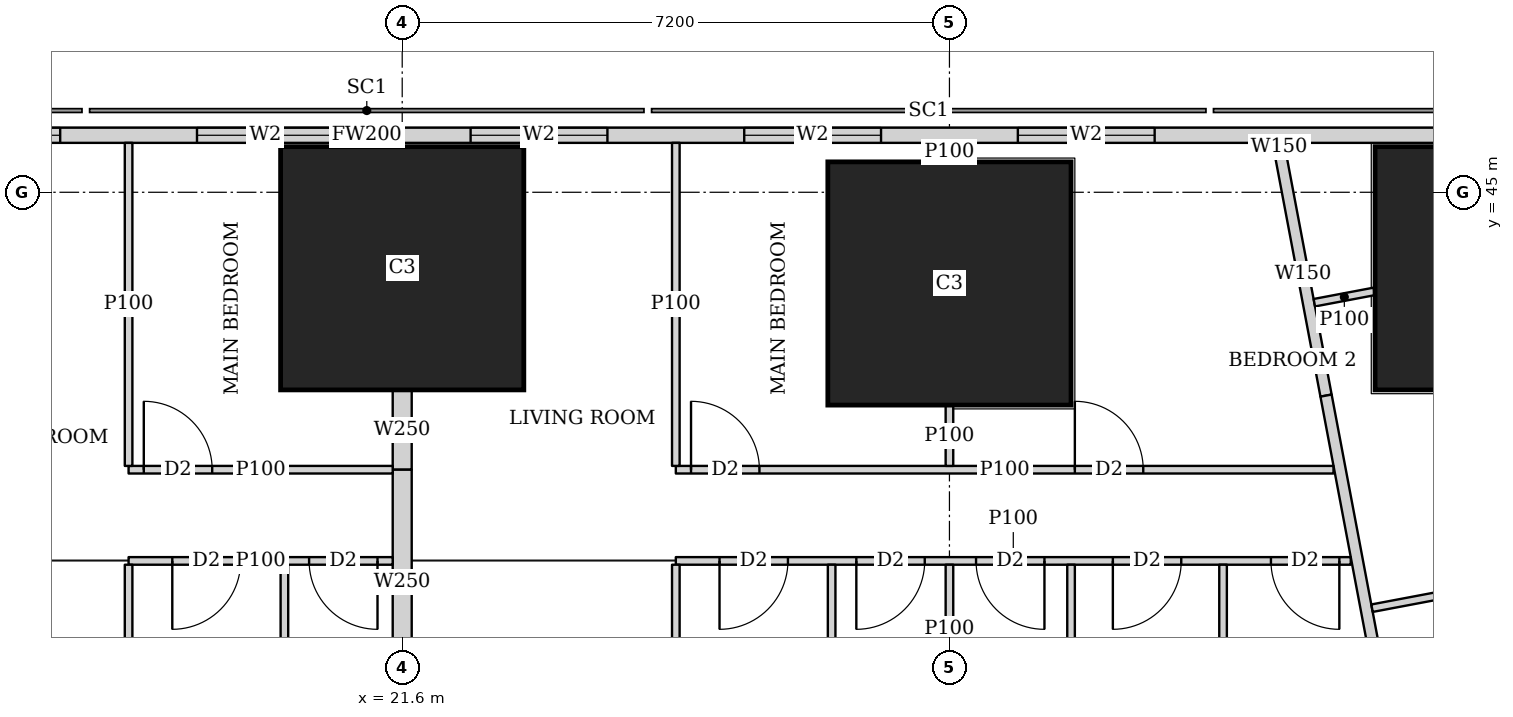
"""IFC4 building model, lengths in metres.
Left out: names, types, materials, properties, quantities, classifications, styles, units other than length and angle.
Written with IfcOpenShell. Run it as: python <this file> out.ifc"""

import sys

from ifc_helpers import new_model, si_unit, direction, frame, frame_2d, origin, origin_2d, place, context, subcontext, project, spatial, rectangle, extrude, element, fill, save


model = new_model("IFC4")
c1 = context("Model", 3, precision=1e-05, world=origin(), true_north=direction((0.0, 1.0)))
c2 = subcontext(c1, "Body", "Model", "MODEL_VIEW")
j1 = project(units=[si_unit("LENGTHUNIT", "METRE"), si_unit("PLANEANGLEUNIT", "RADIAN")], contexts=[c1])
p1 = place(None, origin())
s1 = spatial("IfcSite", under=j1, at=p1, CompositionType="ELEMENT")
p2 = place(p1, origin())
s2 = spatial("IfcBuilding", under=s1, at=p2, CompositionType="ELEMENT")
p3 = place(p2, frame((0.0, 0.0, 20.0)))
s3 = spatial("IfcBuildingStorey", under=s2, at=p3, CompositionType="ELEMENT", Elevation=20.0)
p4 = place(p3, frame((21.6, 44.0, -0.3), z_axis=(0.0, 0.0, 1.0), x_axis=(1.0, 0.0, 0.0)))
e1 = element("IfcColumn", 1, at=p4, inside=s3, PredefinedType="COLUMN", context=c2, shape_type="SweptSolid", body=[
    extrude(rectangle(XDim=3.2, YDim=3.2, at=origin_2d()), origin(), (0.0, 0.0, 1.0), 4.05),
])
p5 = place(p3, frame((28.8, 43.8, 0.0), z_axis=(0.0, 0.0, 1.0), x_axis=(1.0, 0.0, 0.0)))
e2 = element("IfcColumn", 2, at=p5, inside=s3, PredefinedType="COLUMN", context=c2, shape_type="SweptSolid", body=[
    extrude(rectangle(XDim=3.2, YDim=3.2, at=origin_2d()), origin(), (0.0, 0.0, 1.0), 3.75),
])
p6 = place(p3, frame((36.0, 44.0, -0.3), z_axis=(0.0, 0.0, 1.0), x_axis=(1.0, 0.0, 0.0)))
e3 = element("IfcColumn", 3, at=p6, inside=s3, PredefinedType="COLUMN", context=c2, shape_type="SweptSolid", body=[
    extrude(rectangle(XDim=3.2, YDim=3.2, at=origin_2d()), origin(), (0.0, 0.0, 1.0), 4.05),
])
p7 = place(p3, frame((40.106, 45.75, 0.0), z_axis=(0.0, 0.0, 1.0), x_axis=(-1.0, 0.0, 0.0)))
e4 = element("IfcWall", 4, at=p7, inside=s3, PredefinedType="SOLIDWALL", context=c2, shape_type="SweptSolid", body=[
    extrude(rectangle(XDim=37.943, YDim=0.2, at=frame_2d((18.971, 0.0))), origin(), (0.0, 0.0, 1.0), 3.5),
])
p8 = place(p7, frame((8.606, 0.0, 0.9)))
e5 = element("IfcOpeningElement", 5, at=p8, cuts=e4, PredefinedType="OPENING", context=c2, shape_type="SweptSolid", body=[
    extrude(rectangle(XDim=1.8, YDim=1.5, at=frame_2d((0.9, 0.75))), frame((0.0, 0.11, 0.0), z_axis=(0.0, -1.0, 0.0), x_axis=(1.0, 0.0, 0.0)), (0.0, 0.0, 1.0), 0.22),
])
p9 = place(p7, frame((12.206, 0.0, 0.9)))
e6 = element("IfcOpeningElement", 6, at=p9, cuts=e4, PredefinedType="OPENING", context=c2, shape_type="SweptSolid", body=[
    extrude(rectangle(XDim=1.8, YDim=1.5, at=frame_2d((0.9, 0.75))), frame((0.0, 0.11, 0.0), z_axis=(0.0, -1.0, 0.0), x_axis=(1.0, 0.0, 0.0)), (0.0, 0.0, 1.0), 0.22),
])
p10 = place(p7, frame((15.806, 0.0, 0.9)))
e7 = element("IfcOpeningElement", 7, at=p10, cuts=e4, PredefinedType="OPENING", context=c2, shape_type="SweptSolid", body=[
    extrude(rectangle(XDim=1.8, YDim=1.5, at=frame_2d((0.9, 0.75))), frame((0.0, 0.11, 0.0), z_axis=(0.0, -1.0, 0.0), x_axis=(1.0, 0.0, 0.0)), (0.0, 0.0, 1.0), 0.22),
])
p11 = place(p7, frame((19.406, 0.0, 0.9)))
e8 = element("IfcOpeningElement", 8, at=p11, cuts=e4, PredefinedType="OPENING", context=c2, shape_type="SweptSolid", body=[
    extrude(rectangle(XDim=1.8, YDim=1.5, at=frame_2d((0.9, 0.75))), frame((0.0, 0.11, 0.0), z_axis=(0.0, -1.0, 0.0), x_axis=(1.0, 0.0, 0.0)), (0.0, 0.0, 1.0), 0.22),
])
p12 = place(p7, frame((23.006, 0.0, 0.9)))
e9 = element("IfcOpeningElement", 9, at=p12, cuts=e4, PredefinedType="OPENING", context=c2, shape_type="SweptSolid", body=[
    extrude(rectangle(XDim=1.8, YDim=1.5, at=frame_2d((0.9, 0.75))), frame((0.0, 0.11, 0.0), z_axis=(0.0, -1.0, 0.0), x_axis=(1.0, 0.0, 0.0)), (0.0, 0.0, 1.0), 0.22),
])
p13 = place(p7, frame((26.606, 0.0, 0.9)))
e10 = element("IfcOpeningElement", 10, at=p13, cuts=e4, PredefinedType="OPENING", context=c2, shape_type="SweptSolid", body=[
    extrude(rectangle(XDim=1.8, YDim=1.5, at=frame_2d((0.9, 0.75))), frame((0.0, 0.11, 0.0), z_axis=(0.0, -1.0, 0.0), x_axis=(1.0, 0.0, 0.0)), (0.0, 0.0, 1.0), 0.22),
])
p14 = place(p3, frame((33.127, 45.65, 0.0), z_axis=(0.0, 0.0, 1.0), x_axis=(0.184660164975, -0.98280243359, 0.0)))
e11 = element("IfcWall", 11, at=p14, inside=s3, PredefinedType="SOLIDWALL", context=c2, shape_type="SweptSolid", body=[
    extrude(rectangle(XDim=0.119, YDim=0.15, at=frame_2d((0.06, 0.0))), origin(), (0.0, 0.0, 1.0), 3.5),
])
p15 = place(p3, frame((33.149, 45.533, 0.0), z_axis=(0.0, 0.0, 1.0), x_axis=(0.185606774758, -0.98262410166, 0.0)))
e12 = element("IfcWall", 12, at=p15, inside=s3, PredefinedType="SOLIDWALL", context=c2, shape_type="SweptSolid", body=[
    extrude(rectangle(XDim=3.265, YDim=0.15, at=frame_2d((1.632, 0.0))), origin(), (0.0, 0.0, 1.0), 2.05),
])
p16 = place(p3, frame((33.755, 42.325, 0.0), z_axis=(0.0, 0.0, 1.0), x_axis=(0.185611461091, -0.982623216453, 0.0)))
e13 = element("IfcWall", 13, at=p16, inside=s3, PredefinedType="SOLIDWALL", context=c2, shape_type="SweptSolid", body=[
    extrude(rectangle(XDim=40.241, YDim=0.15, at=frame_2d((20.121, 0.0))), origin(), (0.0, 0.0, 1.0), 2.5),
])
p17 = place(p16, frame((7.325, 0.0, 0.0)))
e14 = element("IfcOpeningElement", 14, at=p17, cuts=e13, PredefinedType="OPENING", context=c2, shape_type="SweptSolid", body=[
    extrude(rectangle(XDim=1.0, YDim=2.1, at=frame_2d((0.5, 1.05))), frame((0.0, 0.085, 0.0), z_axis=(0.0, -1.0, 0.0), x_axis=(1.0, 0.0, 0.0)), (0.0, 0.0, 1.0), 0.17),
])
p18 = place(p16, frame((11.902, 0.0, 0.0)))
e15 = element("IfcOpeningElement", 15, at=p18, cuts=e13, PredefinedType="OPENING", context=c2, shape_type="SweptSolid", body=[
    extrude(rectangle(XDim=1.0, YDim=2.1, at=frame_2d((0.5, 1.05))), frame((0.0, 0.085, 0.0), z_axis=(0.0, -1.0, 0.0), x_axis=(1.0, 0.0, 0.0)), (0.0, 0.0, 1.0), 0.17),
])
p19 = place(p16, frame((25.718, 0.0, 0.0)))
e16 = element("IfcOpeningElement", 16, at=p19, cuts=e13, PredefinedType="OPENING", context=c2, shape_type="SweptSolid", body=[
    extrude(rectangle(XDim=1.0, YDim=2.1, at=frame_2d((0.5, 1.05))), frame((0.0, 0.085, 0.0), z_axis=(0.0, -1.0, 0.0), x_axis=(1.0, 0.0, 0.0)), (0.0, 0.0, 1.0), 0.17),
])
p20 = place(p16, frame((31.788, 0.0, 0.0)))
e17 = element("IfcOpeningElement", 17, at=p20, cuts=e13, PredefinedType="OPENING", context=c2, shape_type="SweptSolid", body=[
    extrude(rectangle(XDim=1.0, YDim=2.1, at=frame_2d((0.5, 1.05))), frame((0.0, 0.085, 0.0), z_axis=(0.0, -1.0, 0.0), x_axis=(1.0, 0.0, 0.0)), (0.0, 0.0, 1.0), 0.17),
])
p21 = place(p3, frame((34.39, 43.696, 0.0), z_axis=(0.0, 0.0, 1.0), x_axis=(-0.982640737979, -0.185518678479, 0.0)))
e18 = element("IfcWall", 18, at=p21, inside=s3, PredefinedType="PARTITIONING", context=c2, shape_type="SweptSolid", body=[
    extrude(rectangle(XDim=0.803, YDim=0.1, at=frame_2d((0.401, 0.0))), origin(), (0.0, 0.0, 1.0), 2.05),
])
p22 = place(p3, frame((37.823, 40.182, 0.0), z_axis=(0.0, 0.0, 1.0), x_axis=(-0.98263926043, -0.185526504472, 0.0)))
e19 = element("IfcWall", 19, at=p22, inside=s3, PredefinedType="PARTITIONING", context=c2, shape_type="SweptSolid", body=[
    extrude(rectangle(XDim=3.524, YDim=0.1, at=frame_2d((1.762, 0.0))), origin(), (0.0, 0.0, 1.0), 3.5),
])
p23 = place(p3, frame((18.0, 41.35, 0.0), z_axis=(0.0, 0.0, 1.0), x_axis=(1.0, 0.0, 0.0)))
e20 = element("IfcWall", 20, at=p23, inside=s3, PredefinedType="PARTITIONING", context=c2, shape_type="SweptSolid", body=[
    extrude(rectangle(XDim=3.475, YDim=0.1, at=frame_2d((1.738, 0.0))), origin(), (0.0, 0.0, 1.0), 3.5),
])
p24 = place(p23, frame((0.2, 0.0, 0.0)))
e21 = element("IfcOpeningElement", 21, at=p24, cuts=e20, PredefinedType="OPENING", context=c2, shape_type="SweptSolid", body=[
    extrude(rectangle(XDim=0.9, YDim=2.1, at=frame_2d((0.45, 1.05))), frame((0.0, 0.06, 0.0), z_axis=(0.0, -1.0, 0.0), x_axis=(1.0, 0.0, 0.0)), (0.0, 0.0, 1.0), 0.12),
])
p25 = place(p3, frame((18.0, 40.15, 0.0), z_axis=(0.0, 0.0, 1.0), x_axis=(1.0, 0.0, 0.0)))
e22 = element("IfcWall", 22, at=p25, inside=s3, PredefinedType="PARTITIONING", context=c2, shape_type="SweptSolid", body=[
    extrude(rectangle(XDim=3.475, YDim=0.1, at=frame_2d((1.738, 0.0))), origin(), (0.0, 0.0, 1.0), 3.5),
])
p26 = place(p25, frame((0.575, 0.0, 0.0)))
e23 = element("IfcOpeningElement", 23, at=p26, cuts=e22, PredefinedType="OPENING", context=c2, shape_type="SweptSolid", body=[
    extrude(rectangle(XDim=0.9, YDim=2.1, at=frame_2d((0.45, 1.05))), frame((0.0, 0.06, 0.0), z_axis=(0.0, -1.0, 0.0), x_axis=(1.0, 0.0, 0.0)), (0.0, 0.0, 1.0), 0.12),
])
p27 = place(p25, frame((2.375, 0.0, 0.0)))
e24 = element("IfcOpeningElement", 24, at=p27, cuts=e22, PredefinedType="OPENING", context=c2, shape_type="SweptSolid", body=[
    extrude(rectangle(XDim=0.9, YDim=2.1, at=frame_2d((0.45, 1.05))), frame((0.0, 0.06, 0.0), z_axis=(0.0, -1.0, 0.0), x_axis=(1.0, 0.0, 0.0)), (0.0, 0.0, 1.0), 0.12),
])
p28 = place(p3, frame((18.0, 41.4, 0.0), z_axis=(0.0, 0.0, 1.0), x_axis=(0.0, 1.0, 0.0)))
e25 = element("IfcWall", 25, at=p28, inside=s3, PredefinedType="PARTITIONING", context=c2, shape_type="SweptSolid", body=[
    extrude(rectangle(XDim=4.25, YDim=0.1, at=frame_2d((2.125, 0.0))), origin(), (0.0, 0.0, 1.0), 2.05),
])
for number, where, z_axis, x_axis in (
    (26, (18.0, 36.575, 0.0), (0.0, 0.0, 1.0), (0.0, 1.0, 0.0)),
    (27, (20.05, 36.575, 0.0), (0.0, 0.0, 1.0), (0.0, 1.0, 0.0)),
):
    element("IfcWall", number, at=place(p3, frame(where, z_axis=z_axis, x_axis=x_axis)), inside=s3, PredefinedType="PARTITIONING", context=c2, shape_type="SweptSolid", body=[
        extrude(rectangle(XDim=3.525, YDim=0.1, at=frame_2d((1.763, 0.0))), origin(), (0.0, 0.0, 1.0), 3.5),
    ])
p29 = place(p3, frame((25.2, 41.35, 0.0), z_axis=(0.0, 0.0, 1.0), x_axis=(1.0, 0.0, 0.0)))
e28 = element("IfcWall", 28, at=p29, inside=s3, PredefinedType="PARTITIONING", context=c2, shape_type="SweptSolid", body=[
    extrude(rectangle(XDim=8.653, YDim=0.1, at=frame_2d((4.327, 0.0))), origin(), (0.0, 0.0, 1.0), 3.5),
])
p30 = place(p29, frame((0.2, 0.0, 0.0)))
e29 = element("IfcOpeningElement", 29, at=p30, cuts=e28, PredefinedType="OPENING", context=c2, shape_type="SweptSolid", body=[
    extrude(rectangle(XDim=0.9, YDim=2.1, at=frame_2d((0.45, 1.05))), frame((0.0, 0.06, 0.0), z_axis=(0.0, -1.0, 0.0), x_axis=(1.0, 0.0, 0.0)), (0.0, 0.0, 1.0), 0.12),
])
p31 = place(p29, frame((5.25, 0.0, 0.0)))
e30 = element("IfcOpeningElement", 30, at=p31, cuts=e28, PredefinedType="OPENING", context=c2, shape_type="SweptSolid", body=[
    extrude(rectangle(XDim=0.9, YDim=2.1, at=frame_2d((0.45, 1.05))), frame((0.0, 0.06, 0.0), z_axis=(0.0, -1.0, 0.0), x_axis=(1.0, 0.0, 0.0)), (0.0, 0.0, 1.0), 0.12),
])
p32 = place(p3, frame((25.2, 40.15, 0.0), z_axis=(0.0, 0.0, 1.0), x_axis=(1.0, 0.0, 0.0)))
e31 = element("IfcWall", 31, at=p32, inside=s3, PredefinedType="PARTITIONING", context=c2, shape_type="SweptSolid", body=[
    extrude(rectangle(XDim=8.88, YDim=0.1, at=frame_2d((4.44, 0.0))), origin(), (0.0, 0.0, 1.0), 3.5),
])
p33 = place(p32, frame((0.575, 0.0, 0.0)))
e32 = element("IfcOpeningElement", 32, at=p33, cuts=e31, PredefinedType="OPENING", context=c2, shape_type="SweptSolid", body=[
    extrude(rectangle(XDim=0.9, YDim=2.1, at=frame_2d((0.45, 1.05))), frame((0.0, 0.06, 0.0), z_axis=(0.0, -1.0, 0.0), x_axis=(1.0, 0.0, 0.0)), (0.0, 0.0, 1.0), 0.12),
])
p34 = place(p32, frame((3.95, 0.0, 0.0)))
e33 = element("IfcOpeningElement", 33, at=p34, cuts=e31, PredefinedType="OPENING", context=c2, shape_type="SweptSolid", body=[
    extrude(rectangle(XDim=0.9, YDim=2.1, at=frame_2d((0.45, 1.05))), frame((0.0, 0.06, 0.0), z_axis=(0.0, -1.0, 0.0), x_axis=(1.0, 0.0, 0.0)), (0.0, 0.0, 1.0), 0.12),
])
p35 = place(p32, frame((7.83, 0.0, 0.0)))
e34 = element("IfcOpeningElement", 34, at=p35, cuts=e31, PredefinedType="OPENING", context=c2, shape_type="SweptSolid", body=[
    extrude(rectangle(XDim=0.9, YDim=2.1, at=frame_2d((0.45, 1.05))), frame((0.0, 0.06, 0.0), z_axis=(0.0, -1.0, 0.0), x_axis=(1.0, 0.0, 0.0)), (0.0, 0.0, 1.0), 0.12),
])
p36 = place(p32, frame((2.375, 0.0, 0.0)))
e35 = element("IfcOpeningElement", 35, at=p36, cuts=e31, PredefinedType="OPENING", context=c2, shape_type="SweptSolid", body=[
    extrude(rectangle(XDim=0.9, YDim=2.1, at=frame_2d((0.45, 1.05))), frame((0.0, 0.06, 0.0), z_axis=(0.0, -1.0, 0.0), x_axis=(1.0, 0.0, 0.0)), (0.0, 0.0, 1.0), 0.12),
])
p37 = place(p32, frame((5.75, 0.0, 0.0)))
e36 = element("IfcOpeningElement", 36, at=p37, cuts=e31, PredefinedType="OPENING", context=c2, shape_type="SweptSolid", body=[
    extrude(rectangle(XDim=0.9, YDim=2.1, at=frame_2d((0.45, 1.05))), frame((0.0, 0.06, 0.0), z_axis=(0.0, -1.0, 0.0), x_axis=(1.0, 0.0, 0.0)), (0.0, 0.0, 1.0), 0.12),
])
p38 = place(p3, frame((25.2, 41.4, 0.0), z_axis=(0.0, 0.0, 1.0), x_axis=(0.0, 1.0, 0.0)))
e37 = element("IfcWall", 37, at=p38, inside=s3, PredefinedType="PARTITIONING", context=c2, shape_type="SweptSolid", body=[
    extrude(rectangle(XDim=4.25, YDim=0.1, at=frame_2d((2.125, 0.0))), origin(), (0.0, 0.0, 1.0), 2.05),
])
p39 = place(p3, frame((28.8, 41.4, 0.0), z_axis=(0.0, 0.0, 1.0), x_axis=(0.0, 1.0, 0.0)))
e38 = element("IfcWall", 38, at=p39, inside=s3, PredefinedType="PARTITIONING", context=c2, shape_type="SweptSolid", body=[
    extrude(rectangle(XDim=0.799, YDim=0.1, at=frame_2d((0.399, 0.0))), origin(), (0.0, 0.0, 1.0), 3.5),
])
p40 = place(p3, frame((28.8, 45.401, 0.0), z_axis=(0.0, 0.0, 1.0), x_axis=(0.0, 1.0, 0.0)))
e39 = element("IfcWall", 39, at=p40, inside=s3, PredefinedType="PARTITIONING", context=c2, shape_type="SweptSolid", body=[
    extrude(rectangle(XDim=0.249, YDim=0.1, at=frame_2d((0.125, 0.0))), origin(), (0.0, 0.0, 1.0), 3.5),
])
p41 = place(p3, frame((25.2, 36.575, 0.0), z_axis=(0.0, 0.0, 1.0), x_axis=(0.0, 1.0, 0.0)))
e40 = element("IfcWall", 40, at=p41, inside=s3, PredefinedType="PARTITIONING", context=c2, shape_type="SweptSolid", body=[
    extrude(rectangle(XDim=3.525, YDim=0.1, at=frame_2d((1.763, 0.0))), origin(), (0.0, 0.0, 1.0), 3.5),
])
p42 = place(p3, frame((28.8, 38.401, 0.0), z_axis=(0.0, 0.0, 1.0), x_axis=(0.0, 1.0, 0.0)))
e41 = element("IfcWall", 41, at=p42, inside=s3, PredefinedType="PARTITIONING", context=c2, shape_type="SweptSolid", body=[
    extrude(rectangle(XDim=1.699, YDim=0.1, at=frame_2d((0.85, 0.0))), origin(), (0.0, 0.0, 1.0), 3.5),
])
for number, where, z_axis, x_axis in (
    (42, (32.4, 36.575, 0.0), (0.0, 0.0, 1.0), (0.0, 1.0, 0.0)),
    (43, (27.25, 36.575, 0.0), (0.0, 0.0, 1.0), (0.0, 1.0, 0.0)),
    (44, (30.4, 36.575, 0.0), (0.0, 0.0, 1.0), (0.0, 1.0, 0.0)),
):
    element("IfcWall", number, at=place(p3, frame(where, z_axis=z_axis, x_axis=x_axis)), inside=s3, PredefinedType="PARTITIONING", context=c2, shape_type="SweptSolid", body=[
        extrude(rectangle(XDim=3.525, YDim=0.1, at=frame_2d((1.763, 0.0))), origin(), (0.0, 0.0, 1.0), 3.5),
    ])
p43 = place(p3, frame((21.6, 41.35, 0.0), z_axis=(0.0, 0.0, 1.0), x_axis=(0.0, 1.0, 0.0)))
e45 = element("IfcWall", 45, at=p43, inside=s3, PredefinedType="SOLIDWALL", context=c2, shape_type="SweptSolid", body=[
    extrude(rectangle(XDim=1.049, YDim=0.25, at=frame_2d((0.524, 0.0))), origin(), (0.0, 0.0, 1.0), 2.05),
])
p44 = place(p3, frame((21.6, 38.401, 0.0), z_axis=(0.0, 0.0, 1.0), x_axis=(0.0, 1.0, 0.0)))
e46 = element("IfcWall", 46, at=p44, inside=s3, PredefinedType="SOLIDWALL", context=c2, shape_type="SweptSolid", body=[
    extrude(rectangle(XDim=2.949, YDim=0.25, at=frame_2d((1.475, 0.0))), origin(), (0.0, 0.0, 1.0), 3.5),
])
p45 = place(p8, origin())
e47 = element("IfcWindow", 47, at=p45, inside=s3, PartitioningType="SINGLE_PANEL", PredefinedType="WINDOW", context=c2, shape_type="SweptSolid", body=[
    extrude(rectangle(XDim=1.8, YDim=1.5, at=frame_2d((0.9, 0.75))), frame((0.0, 0.03, 0.0), z_axis=(0.0, -1.0, 0.0), x_axis=(1.0, 0.0, 0.0)), (0.0, 0.0, 1.0), 0.06),
])
fill(e5, e47)
p46 = place(p9, origin())
e48 = element("IfcWindow", 48, at=p46, inside=s3, PartitioningType="SINGLE_PANEL", PredefinedType="WINDOW", context=c2, shape_type="SweptSolid", body=[
    extrude(rectangle(XDim=1.8, YDim=1.5, at=frame_2d((0.9, 0.75))), frame((0.0, 0.03, 0.0), z_axis=(0.0, -1.0, 0.0), x_axis=(1.0, 0.0, 0.0)), (0.0, 0.0, 1.0), 0.06),
])
fill(e6, e48)
p47 = place(p10, origin())
e49 = element("IfcWindow", 49, at=p47, inside=s3, PartitioningType="SINGLE_PANEL", PredefinedType="WINDOW", context=c2, shape_type="SweptSolid", body=[
    extrude(rectangle(XDim=1.8, YDim=1.5, at=frame_2d((0.9, 0.75))), frame((0.0, 0.03, 0.0), z_axis=(0.0, -1.0, 0.0), x_axis=(1.0, 0.0, 0.0)), (0.0, 0.0, 1.0), 0.06),
])
fill(e7, e49)
p48 = place(p11, origin())
e50 = element("IfcWindow", 50, at=p48, inside=s3, PartitioningType="SINGLE_PANEL", PredefinedType="WINDOW", context=c2, shape_type="SweptSolid", body=[
    extrude(rectangle(XDim=1.8, YDim=1.5, at=frame_2d((0.9, 0.75))), frame((0.0, 0.03, 0.0), z_axis=(0.0, -1.0, 0.0), x_axis=(1.0, 0.0, 0.0)), (0.0, 0.0, 1.0), 0.06),
])
fill(e8, e50)
p49 = place(p12, origin())
e51 = element("IfcWindow", 51, at=p49, inside=s3, PartitioningType="SINGLE_PANEL", PredefinedType="WINDOW", context=c2, shape_type="SweptSolid", body=[
    extrude(rectangle(XDim=1.8, YDim=1.5, at=frame_2d((0.9, 0.75))), frame((0.0, 0.03, 0.0), z_axis=(0.0, -1.0, 0.0), x_axis=(1.0, 0.0, 0.0)), (0.0, 0.0, 1.0), 0.06),
])
fill(e9, e51)
p50 = place(p24, origin())
e52 = element("IfcDoor", 52, at=p50, inside=s3, OperationType="SINGLE_SWING_LEFT", PredefinedType="DOOR", context=c2, shape_type="SweptSolid", body=[
    extrude(rectangle(XDim=0.9, YDim=2.1, at=frame_2d((0.45, 1.05))), frame((0.0, 0.025, 0.0), z_axis=(0.0, -1.0, 0.0), x_axis=(1.0, 0.0, 0.0)), (0.0, 0.0, 1.0), 0.05),
])
fill(e21, e52)
p51 = place(p26, origin())
e53 = element("IfcDoor", 53, at=p51, inside=s3, OperationType="SINGLE_SWING_RIGHT", PredefinedType="DOOR", context=c2, shape_type="SweptSolid", body=[
    extrude(rectangle(XDim=0.9, YDim=2.1, at=frame_2d((0.45, 1.05))), frame((0.0, 0.025, 0.0), z_axis=(0.0, -1.0, 0.0), x_axis=(1.0, 0.0, 0.0)), (0.0, 0.0, 1.0), 0.05),
])
fill(e23, e53)
p52 = place(p27, origin())
e54 = element("IfcDoor", 54, at=p52, inside=s3, OperationType="SINGLE_SWING_LEFT", PredefinedType="DOOR", context=c2, shape_type="SweptSolid", body=[
    extrude(rectangle(XDim=0.9, YDim=2.1, at=frame_2d((0.45, 1.05))), frame((0.0, 0.025, 0.0), z_axis=(0.0, -1.0, 0.0), x_axis=(1.0, 0.0, 0.0)), (0.0, 0.0, 1.0), 0.05),
])
fill(e24, e54)
p53 = place(p30, origin())
e55 = element("IfcDoor", 55, at=p53, inside=s3, OperationType="SINGLE_SWING_LEFT", PredefinedType="DOOR", context=c2, shape_type="SweptSolid", body=[
    extrude(rectangle(XDim=0.9, YDim=2.1, at=frame_2d((0.45, 1.05))), frame((0.0, 0.025, 0.0), z_axis=(0.0, -1.0, 0.0), x_axis=(1.0, 0.0, 0.0)), (0.0, 0.0, 1.0), 0.05),
])
fill(e29, e55)
p54 = place(p31, origin())
e56 = element("IfcDoor", 56, at=p54, inside=s3, OperationType="SINGLE_SWING_LEFT", PredefinedType="DOOR", context=c2, shape_type="SweptSolid", body=[
    extrude(rectangle(XDim=0.9, YDim=2.1, at=frame_2d((0.45, 1.05))), frame((0.0, 0.025, 0.0), z_axis=(0.0, -1.0, 0.0), x_axis=(1.0, 0.0, 0.0)), (0.0, 0.0, 1.0), 0.05),
])
fill(e30, e56)
p55 = place(p33, origin())
e57 = element("IfcDoor", 57, at=p55, inside=s3, OperationType="SINGLE_SWING_RIGHT", PredefinedType="DOOR", context=c2, shape_type="SweptSolid", body=[
    extrude(rectangle(XDim=0.9, YDim=2.1, at=frame_2d((0.45, 1.05))), frame((0.0, 0.025, 0.0), z_axis=(0.0, -1.0, 0.0), x_axis=(1.0, 0.0, 0.0)), (0.0, 0.0, 1.0), 0.05),
])
fill(e32, e57)
p56 = place(p34, origin())
e58 = element("IfcDoor", 58, at=p56, inside=s3, OperationType="SINGLE_SWING_LEFT", PredefinedType="DOOR", context=c2, shape_type="SweptSolid", body=[
    extrude(rectangle(XDim=0.9, YDim=2.1, at=frame_2d((0.45, 1.05))), frame((0.0, 0.025, 0.0), z_axis=(0.0, -1.0, 0.0), x_axis=(1.0, 0.0, 0.0)), (0.0, 0.0, 1.0), 0.05),
])
fill(e33, e58)
p57 = place(p35, origin())
e59 = element("IfcDoor", 59, at=p57, inside=s3, OperationType="SINGLE_SWING_LEFT", PredefinedType="DOOR", context=c2, shape_type="SweptSolid", body=[
    extrude(rectangle(XDim=0.9, YDim=2.1, at=frame_2d((0.45, 1.05))), frame((0.0, 0.025, 0.0), z_axis=(0.0, -1.0, 0.0), x_axis=(1.0, 0.0, 0.0)), (0.0, 0.0, 1.0), 0.05),
])
fill(e34, e59)
p58 = place(p36, origin())
e60 = element("IfcDoor", 60, at=p58, inside=s3, OperationType="SINGLE_SWING_RIGHT", PredefinedType="DOOR", context=c2, shape_type="SweptSolid", body=[
    extrude(rectangle(XDim=0.9, YDim=2.1, at=frame_2d((0.45, 1.05))), frame((0.0, 0.025, 0.0), z_axis=(0.0, -1.0, 0.0), x_axis=(1.0, 0.0, 0.0)), (0.0, 0.0, 1.0), 0.05),
])
fill(e35, e60)
p59 = place(p37, origin())
e61 = element("IfcDoor", 61, at=p59, inside=s3, OperationType="SINGLE_SWING_RIGHT", PredefinedType="DOOR", context=c2, shape_type="SweptSolid", body=[
    extrude(rectangle(XDim=0.9, YDim=2.1, at=frame_2d((0.45, 1.05))), frame((0.0, 0.025, 0.0), z_axis=(0.0, -1.0, 0.0), x_axis=(1.0, 0.0, 0.0)), (0.0, 0.0, 1.0), 0.05),
])
fill(e36, e61)
save(model, sys.argv[1])
